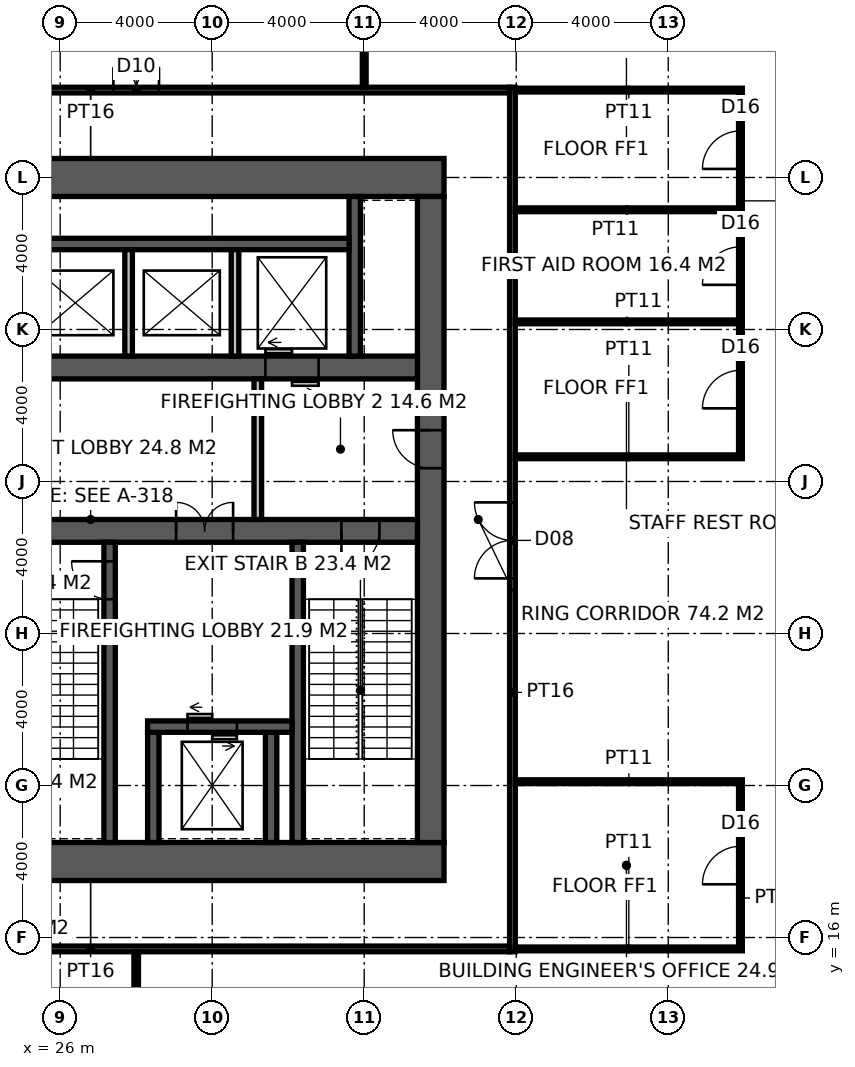
"""IFC4 building model, lengths in metres.
Left out: names, types, materials, properties, quantities, classifications, styles, units other than length and angle.
Written with IfcOpenShell. Run it as: python <this file> out.ifc"""

import sys

from ifc_helpers import new_model, si_unit, direction, frame, frame_2d, origin, place, context, subcontext, project, spatial, rectangle, extrude, element, fill, save


model = new_model("IFC4")
c1 = context("Model", 3, precision=1e-05, world=origin(), true_north=direction((0.0, 1.0)))
c2 = subcontext(c1, "Body", "Model", "MODEL_VIEW")
j1 = project(units=[si_unit("LENGTHUNIT", "METRE"), si_unit("PLANEANGLEUNIT", "RADIAN")], contexts=[c1])
p1 = place(None, origin())
s1 = spatial("IfcSite", under=j1, at=p1, CompositionType="ELEMENT")
p2 = place(p1, origin())
s2 = spatial("IfcBuilding", under=s1, at=p2, CompositionType="ELEMENT")
p3 = place(p2, frame((0.0, 0.0, 71.0)))
s3 = spatial("IfcBuildingStorey", under=s2, at=p3, CompositionType="ELEMENT", Elevation=71.0)
p4 = place(p3, frame((18.5, 18.0, -0.15), z_axis=(0.0, 0.0, 1.0), x_axis=(1.0, 0.0, 0.0)))
e1 = element("IfcWall", 1, at=p4, inside=s3, PredefinedType="SHEAR", context=c2, shape_type="SweptSolid", body=[
    extrude(rectangle(XDim=17.6, YDim=1.0, at=frame_2d((8.8, 0.0))), origin(), (0.0, 0.0, 1.0), 5.4),
])
p5 = place(p4, frame((3.45, 0.0, 0.15)))
e2 = element("IfcOpeningElement", 2, at=p5, cuts=e1, PredefinedType="OPENING", context=c2, shape_type="SweptSolid", body=[
    extrude(rectangle(XDim=1.5, YDim=2.4, at=frame_2d((0.75, 1.2))), frame((0.0, 0.51, 0.0), z_axis=(0.0, -1.0, 0.0), x_axis=(1.0, 0.0, 0.0)), (0.0, 0.0, 1.0), 1.02),
])
p6 = place(p3, frame((18.5, 36.0, -0.15), z_axis=(0.0, 0.0, 1.0), x_axis=(1.0, 0.0, 0.0)))
e3 = element("IfcWall", 3, at=p6, inside=s3, PredefinedType="SHEAR", context=c2, shape_type="SweptSolid", body=[
    extrude(rectangle(XDim=17.6, YDim=1.0, at=frame_2d((8.8, 0.0))), origin(), (0.0, 0.0, 1.0), 5.4),
])
p7 = place(p3, frame((35.75, 18.5, -0.15), z_axis=(0.0, 0.0, 1.0), x_axis=(0.0, 1.0, 0.0)))
e4 = element("IfcWall", 4, at=p7, inside=s3, PredefinedType="SHEAR", context=c2, shape_type="SweptSolid", body=[
    extrude(rectangle(XDim=17.0, YDim=0.7, at=frame_2d((8.5, 0.0))), origin(), (0.0, 0.0, 1.0), 5.4),
])
p8 = place(p7, frame((9.85, 0.0, 0.15)))
e5 = element("IfcOpeningElement", 5, at=p8, cuts=e4, PredefinedType="OPENING", context=c2, shape_type="SweptSolid", body=[
    extrude(rectangle(XDim=1.0, YDim=2.2, at=frame_2d((0.5, 1.1))), frame((0.0, 0.36, 0.0), z_axis=(0.0, -1.0, 0.0), x_axis=(1.0, 0.0, 0.0)), (0.0, 0.0, 1.0), 0.72),
])
p9 = place(p3, frame((24.15, 26.7, -0.15), z_axis=(0.0, 0.0, 1.0), x_axis=(1.0, 0.0, 0.0)))
e6 = element("IfcWall", 6, at=p9, inside=s3, PredefinedType="SHEAR", context=c2, shape_type="SweptSolid", body=[
    extrude(rectangle(XDim=11.25, YDim=0.6, at=frame_2d((5.625, 0.0))), origin(), (0.0, 0.0, 1.0), 5.4),
])
p10 = place(p9, frame((9.25, 0.0, 0.15)))
e7 = element("IfcOpeningElement", 7, at=p10, cuts=e6, PredefinedType="OPENING", context=c2, shape_type="SweptSolid", body=[
    extrude(rectangle(XDim=1.0, YDim=2.2, at=frame_2d((0.5, 1.1))), frame((0.0, 0.31, 0.0), z_axis=(0.0, -1.0, 0.0), x_axis=(1.0, 0.0, 0.0)), (0.0, 0.0, 1.0), 0.62),
])
p11 = place(p9, frame((4.9, 0.0, 0.15)))
e8 = element("IfcOpeningElement", 8, at=p11, cuts=e6, PredefinedType="OPENING", context=c2, shape_type="SweptSolid", body=[
    extrude(rectangle(XDim=1.5, YDim=2.4, at=frame_2d((0.75, 1.2))), frame((0.0, 0.31, 0.0), z_axis=(0.0, -1.0, 0.0), x_axis=(1.0, 0.0, 0.0)), (0.0, 0.0, 1.0), 0.62),
])
p12 = place(p3, frame((27.3, 18.5, -0.15), z_axis=(0.0, 0.0, 1.0), x_axis=(0.0, 1.0, 0.0)))
e9 = element("IfcWall", 9, at=p12, inside=s3, PredefinedType="SHEAR", context=c2, shape_type="SweptSolid", body=[
    extrude(rectangle(XDim=7.9, YDim=0.3, at=frame_2d((3.95, 0.0))), origin(), (0.0, 0.0, 1.0), 5.4),
])
p13 = place(p12, frame((6.4, 0.0, 0.15)))
e10 = element("IfcOpeningElement", 10, at=p13, cuts=e9, PredefinedType="OPENING", context=c2, shape_type="SweptSolid", body=[
    extrude(rectangle(XDim=1.0, YDim=2.2, at=frame_2d((0.5, 1.1))), frame((0.0, 0.16, 0.0), z_axis=(0.0, -1.0, 0.0), x_axis=(1.0, 0.0, 0.0)), (0.0, 0.0, 1.0), 0.32),
])
p14 = place(p3, frame((32.25, 18.5, -0.15), z_axis=(0.0, 0.0, 1.0), x_axis=(0.0, 1.0, 0.0)))
e11 = element("IfcWall", 11, at=p14, inside=s3, PredefinedType="SHEAR", context=c2, shape_type="SweptSolid", body=[
    extrude(rectangle(XDim=7.9, YDim=0.3, at=frame_2d((3.95, 0.0))), origin(), (0.0, 0.0, 1.0), 5.4),
])
for number, where, z_axis, x_axis in (
    (12, (28.45, 18.5, -0.15), (0.0, 0.0, 1.0), (0.0, 1.0, 0.0)),
    (13, (31.55, 18.5, -0.15), (0.0, 0.0, 1.0), (0.0, 1.0, 0.0)),
):
    element("IfcWall", number, at=place(p3, frame(where, z_axis=z_axis, x_axis=x_axis)), inside=s3, PredefinedType="SHEAR", context=c2, shape_type="SweptSolid", body=[
        extrude(rectangle(XDim=2.9, YDim=0.3, at=frame_2d((1.45, 0.0))), origin(), (0.0, 0.0, 1.0), 5.4),
    ])
p15 = place(p3, frame((28.3, 21.55, -0.15), z_axis=(0.0, 0.0, 1.0), x_axis=(1.0, 0.0, 0.0)))
e14 = element("IfcWall", 14, at=p15, inside=s3, PredefinedType="SHEAR", context=c2, shape_type="SweptSolid", body=[
    extrude(rectangle(XDim=3.8, YDim=0.3, at=frame_2d((1.9, 0.0))), origin(), (0.0, 0.0, 1.0), 5.4),
])
p16 = place(p15, frame((1.05, 0.0, 0.15)))
e15 = element("IfcOpeningElement", 15, at=p16, cuts=e14, PredefinedType="OPENING", context=c2, shape_type="SweptSolid", body=[
    extrude(rectangle(XDim=1.3, YDim=2.4, at=frame_2d((0.65, 1.2))), frame((0.0, 0.16, 0.0), z_axis=(0.0, -1.0, 0.0), x_axis=(1.0, 0.0, 0.0)), (0.0, 0.0, 1.0), 0.32),
])
p17 = place(p3, frame((24.15, 31.0, -0.15), z_axis=(0.0, 0.0, 1.0), x_axis=(1.0, 0.0, 0.0)))
e16 = element("IfcWall", 16, at=p17, inside=s3, PredefinedType="SHEAR", context=c2, shape_type="SweptSolid", body=[
    extrude(rectangle(XDim=11.25, YDim=0.6, at=frame_2d((5.625, 0.0))), origin(), (0.0, 0.0, 1.0), 5.4),
])
p18 = place(p17, frame((7.25, 0.0, 0.15)))
e17 = element("IfcOpeningElement", 17, at=p18, cuts=e16, PredefinedType="OPENING", context=c2, shape_type="SweptSolid", body=[
    extrude(rectangle(XDim=1.4, YDim=2.4, at=frame_2d((0.7, 1.2))), frame((0.0, 0.31, 0.0), z_axis=(0.0, -1.0, 0.0), x_axis=(1.0, 0.0, 0.0)), (0.0, 0.0, 1.0), 0.62),
])
p19 = place(p3, frame((33.75, 31.3, -0.15), z_axis=(0.0, 0.0, 1.0), x_axis=(0.0, 1.0, 0.0)))
e18 = element("IfcWall", 18, at=p19, inside=s3, PredefinedType="SHEAR", context=c2, shape_type="SweptSolid", body=[
    extrude(rectangle(XDim=4.2, YDim=0.3, at=frame_2d((2.1, 0.0))), origin(), (0.0, 0.0, 1.0), 5.4),
])
p20 = place(p3, frame((25.0, 34.25, -0.15), z_axis=(0.0, 0.0, 1.0), x_axis=(1.0, 0.0, 0.0)))
e19 = element("IfcWall", 19, at=p20, inside=s3, PredefinedType="SHEAR", context=c2, shape_type="SweptSolid", body=[
    extrude(rectangle(XDim=8.6, YDim=0.3, at=frame_2d((4.3, 0.0))), origin(), (0.0, 0.0, 1.0), 5.4),
])
for number, where, z_axis, x_axis in (
    (20, (27.8, 31.3, -0.15), (0.0, 0.0, 1.0), (0.0, 1.0, 0.0)),
    (21, (30.6, 31.3, -0.15), (0.0, 0.0, 1.0), (0.0, 1.0, 0.0)),
):
    element("IfcWall", number, at=place(p3, frame(where, z_axis=z_axis, x_axis=x_axis)), inside=s3, PredefinedType="SOLIDWALL", context=c2, shape_type="SweptSolid", body=[
        extrude(rectangle(XDim=2.8, YDim=0.2, at=frame_2d((1.4, 0.0))), origin(), (0.0, 0.0, 1.0), 5.4),
    ])
p21 = place(p3, frame((31.2, 27.0, 0.0), z_axis=(0.0, 0.0, 1.0), x_axis=(0.0, 1.0, 0.0)))
e22 = element("IfcWall", 22, at=p21, inside=s3, PredefinedType="SOLIDWALL", context=c2, shape_type="SweptSolid", body=[
    extrude(rectangle(XDim=3.7, YDim=0.2, at=frame_2d((1.85, 0.0))), origin(), (0.0, 0.0, 1.0), 5.25),
])
p22 = place(p3, frame((37.9, 15.625, 0.0), z_axis=(0.0, 0.0, 1.0), x_axis=(0.0, 1.0, 0.0)))
e23 = element("IfcWall", 23, at=p22, inside=s3, PredefinedType="PARTITIONING", context=c2, shape_type="SweptSolid", body=[
    extrude(rectangle(XDim=22.75, YDim=0.15, at=frame_2d((11.375, 0.0))), origin(), (0.0, 0.0, 1.0), 4.35),
])
p23 = place(p22, frame((9.825, 0.0, 0.0)))
e24 = element("IfcOpeningElement", 24, at=p23, cuts=e23, PredefinedType="OPENING", context=c2, shape_type="SweptSolid", body=[
    extrude(rectangle(XDim=2.0, YDim=2.4, at=frame_2d((1.0, 1.2))), frame((0.0, 0.085, 0.0), z_axis=(0.0, -1.0, 0.0), x_axis=(1.0, 0.0, 0.0)), (0.0, 0.0, 1.0), 0.17),
])
p24 = place(p3, frame((15.775, 15.7, 0.0), z_axis=(0.0, 0.0, 1.0), x_axis=(1.0, 0.0, 0.0)))
e25 = element("IfcWall", 25, at=p24, inside=s3, PredefinedType="PARTITIONING", context=c2, shape_type="SweptSolid", body=[
    extrude(rectangle(XDim=22.05, YDim=0.15, at=frame_2d((11.025, 0.0))), origin(), (0.0, 0.0, 1.0), 5.25),
])
p25 = place(p3, frame((15.775, 38.3, 0.0), z_axis=(0.0, 0.0, 1.0), x_axis=(1.0, 0.0, 0.0)))
e26 = element("IfcWall", 26, at=p25, inside=s3, PredefinedType="PARTITIONING", context=c2, shape_type="SweptSolid", body=[
    extrude(rectangle(XDim=22.05, YDim=0.15, at=frame_2d((11.025, 0.0))), origin(), (0.0, 0.0, 1.0), 5.25),
])
p26 = place(p25, frame((11.625, 0.0, 0.0)))
e27 = element("IfcOpeningElement", 27, at=p26, cuts=e26, PredefinedType="OPENING", context=c2, shape_type="SweptSolid", body=[
    extrude(rectangle(XDim=1.2, YDim=2.2, at=frame_2d((0.6, 1.1))), frame((0.0, 0.085, 0.0), z_axis=(0.0, -1.0, 0.0), x_axis=(1.0, 0.0, 0.0)), (0.0, 0.0, 1.0), 0.17),
])
p27 = place(p3, frame((34.0, 38.375, 0.0), z_axis=(0.0, 0.0, 1.0), x_axis=(0.0, 1.0, 0.0)))
e28 = element("IfcWall", 28, at=p27, inside=s3, PredefinedType="PARTITIONING", context=c2, shape_type="SweptSolid", body=[
    extrude(rectangle(XDim=3.675, YDim=0.1, at=frame_2d((1.837, 0.0))), origin(), (0.0, 0.0, 1.0), 4.25),
])
p28 = place(p3, frame((28.0, 0.3, 0.0), z_axis=(0.0, 0.0, 1.0), x_axis=(0.0, 1.0, 0.0)))
e29 = element("IfcWall", 29, at=p28, inside=s3, PredefinedType="PARTITIONING", context=c2, shape_type="SweptSolid", body=[
    extrude(rectangle(XDim=15.325, YDim=0.12, at=frame_2d((7.663, 0.0))), origin(), (0.0, 0.0, 1.0), 5.25),
])
p29 = place(p3, frame((37.975, 15.7, 0.0), z_axis=(0.0, 0.0, 1.0), x_axis=(1.0, 0.0, 0.0)))
e30 = element("IfcWall", 30, at=p29, inside=s3, PredefinedType="PARTITIONING", context=c2, shape_type="SweptSolid", body=[
    extrude(rectangle(XDim=5.975, YDim=0.1, at=frame_2d((2.987, 0.0))), origin(), (0.0, 0.0, 1.0), 5.25),
])
p30 = place(p3, frame((37.975, 20.1, 0.0), z_axis=(0.0, 0.0, 1.0), x_axis=(1.0, 0.0, 0.0)))
e31 = element("IfcWall", 31, at=p30, inside=s3, PredefinedType="PARTITIONING", context=c2, shape_type="SweptSolid", body=[
    extrude(rectangle(XDim=5.975, YDim=0.1, at=frame_2d((2.987, 0.0))), origin(), (0.0, 0.0, 1.0), 4.35),
])
p31 = place(p3, frame((37.975, 28.65, 0.0), z_axis=(0.0, 0.0, 1.0), x_axis=(1.0, 0.0, 0.0)))
e32 = element("IfcWall", 32, at=p31, inside=s3, PredefinedType="PARTITIONING", context=c2, shape_type="SweptSolid", body=[
    extrude(rectangle(XDim=5.975, YDim=0.1, at=frame_2d((2.987, 0.0))), origin(), (0.0, 0.0, 1.0), 5.25),
])
p32 = place(p3, frame((37.975, 32.2, 0.0), z_axis=(0.0, 0.0, 1.0), x_axis=(1.0, 0.0, 0.0)))
e33 = element("IfcWall", 33, at=p32, inside=s3, PredefinedType="PARTITIONING", context=c2, shape_type="SweptSolid", body=[
    extrude(rectangle(XDim=5.875, YDim=0.1, at=frame_2d((2.938, 0.0))), origin(), (0.0, 0.0, 1.0), 4.35),
])
p33 = place(p3, frame((37.975, 35.15, 0.0), z_axis=(0.0, 0.0, 1.0), x_axis=(1.0, 0.0, 0.0)))
e34 = element("IfcWall", 34, at=p33, inside=s3, PredefinedType="PARTITIONING", context=c2, shape_type="SweptSolid", body=[
    extrude(rectangle(XDim=5.875, YDim=0.1, at=frame_2d((2.938, 0.0))), origin(), (0.0, 0.0, 1.0), 5.25),
])
p34 = place(p3, frame((37.975, 38.3, 0.0), z_axis=(0.0, 0.0, 1.0), x_axis=(1.0, 0.0, 0.0)))
e35 = element("IfcWall", 35, at=p34, inside=s3, PredefinedType="PARTITIONING", context=c2, shape_type="SweptSolid", body=[
    extrude(rectangle(XDim=5.975, YDim=0.1, at=frame_2d((2.987, 0.0))), origin(), (0.0, 0.0, 1.0), 5.25),
])
p35 = place(p3, frame((43.9, 15.75, 0.0), z_axis=(0.0, 0.0, 1.0), x_axis=(0.0, 1.0, 0.0)))
e36 = element("IfcWall", 36, at=p35, inside=s3, PredefinedType="PARTITIONING", context=c2, shape_type="SweptSolid", body=[
    extrude(rectangle(XDim=4.3, YDim=0.1, at=frame_2d((2.15, 0.0))), origin(), (0.0, 0.0, 1.0), 5.25),
])
p36 = place(p35, frame((1.65, 0.0, 0.0)))
e37 = element("IfcOpeningElement", 37, at=p36, cuts=e36, PredefinedType="OPENING", context=c2, shape_type="SweptSolid", body=[
    extrude(rectangle(XDim=1.0, YDim=2.2, at=frame_2d((0.5, 1.1))), frame((0.0, 0.06, 0.0), z_axis=(0.0, -1.0, 0.0), x_axis=(1.0, 0.0, 0.0)), (0.0, 0.0, 1.0), 0.12),
])
p37 = place(p3, frame((43.9, 28.7, 0.0), z_axis=(0.0, 0.0, 1.0), x_axis=(0.0, 1.0, 0.0)))
e38 = element("IfcWall", 38, at=p37, inside=s3, PredefinedType="PARTITIONING", context=c2, shape_type="SweptSolid", body=[
    extrude(rectangle(XDim=9.55, YDim=0.1, at=frame_2d((4.775, 0.0))), origin(), (0.0, 0.0, 1.0), 5.25),
])
p38 = place(p37, frame((1.225, 0.0, 0.0)))
e39 = element("IfcOpeningElement", 39, at=p38, cuts=e38, PredefinedType="OPENING", context=c2, shape_type="SweptSolid", body=[
    extrude(rectangle(XDim=1.0, YDim=2.2, at=frame_2d((0.5, 1.1))), frame((0.0, 0.06, 0.0), z_axis=(0.0, -1.0, 0.0), x_axis=(1.0, 0.0, 0.0)), (0.0, 0.0, 1.0), 0.12),
])
p39 = place(p37, frame((4.475, 0.0, 0.0)))
e40 = element("IfcOpeningElement", 40, at=p39, cuts=e38, PredefinedType="OPENING", context=c2, shape_type="SweptSolid", body=[
    extrude(rectangle(XDim=1.0, YDim=2.2, at=frame_2d((0.5, 1.1))), frame((0.0, 0.06, 0.0), z_axis=(0.0, -1.0, 0.0), x_axis=(1.0, 0.0, 0.0)), (0.0, 0.0, 1.0), 0.12),
])
p40 = place(p37, frame((7.525, 0.0, 0.0)))
e41 = element("IfcOpeningElement", 41, at=p40, cuts=e38, PredefinedType="OPENING", context=c2, shape_type="SweptSolid", body=[
    extrude(rectangle(XDim=1.0, YDim=2.2, at=frame_2d((0.5, 1.1))), frame((0.0, 0.06, 0.0), z_axis=(0.0, -1.0, 0.0), x_axis=(1.0, 0.0, 0.0)), (0.0, 0.0, 1.0), 0.12),
])
p41 = place(p13, origin())
e42 = element("IfcDoor", 42, at=p41, inside=s3, OperationType="SINGLE_SWING_RIGHT", PredefinedType="DOOR", context=c2, shape_type="SweptSolid", body=[
    extrude(rectangle(XDim=1.0, YDim=2.2, at=frame_2d((0.5, 1.1))), frame((0.0, 0.025, 0.0), z_axis=(0.0, -1.0, 0.0), x_axis=(1.0, 0.0, 0.0)), (0.0, 0.0, 1.0), 0.05),
])
fill(e10, e42)
p42 = place(p10, frame((1.0, 0.0, 0.0), z_axis=(0.0, 0.0, 1.0), x_axis=(-1.0, 0.0, 0.0)))
e43 = element("IfcDoor", 43, at=p42, inside=s3, OperationType="SINGLE_SWING_RIGHT", PredefinedType="DOOR", context=c2, shape_type="SweptSolid", body=[
    extrude(rectangle(XDim=1.0, YDim=2.2, at=frame_2d((0.5, 1.1))), frame((0.0, 0.025, 0.0), z_axis=(0.0, -1.0, 0.0), x_axis=(1.0, 0.0, 0.0)), (0.0, 0.0, 1.0), 0.05),
])
fill(e7, e43)
p43 = place(p8, origin())
e44 = element("IfcDoor", 44, at=p43, inside=s3, OperationType="SINGLE_SWING_RIGHT", PredefinedType="DOOR", context=c2, shape_type="SweptSolid", body=[
    extrude(rectangle(XDim=1.0, YDim=2.2, at=frame_2d((0.5, 1.1))), frame((0.0, 0.025, 0.0), z_axis=(0.0, -1.0, 0.0), x_axis=(1.0, 0.0, 0.0)), (0.0, 0.0, 1.0), 0.05),
])
fill(e5, e44)
p44 = place(p11, origin())
e45 = element("IfcDoor", 45, at=p44, inside=s3, OperationType="DOUBLE_DOOR_DOUBLE_SWING", PredefinedType="DOOR", context=c2, shape_type="SweptSolid", body=[
    extrude(rectangle(XDim=1.5, YDim=2.4, at=frame_2d((0.75, 1.2))), frame((0.0, 0.025, 0.0), z_axis=(0.0, -1.0, 0.0), x_axis=(1.0, 0.0, 0.0)), (0.0, 0.0, 1.0), 0.05),
])
fill(e8, e45)
p45 = place(p26, origin())
e46 = element("IfcDoor", 46, at=p45, inside=s3, OperationType="DOUBLE_DOOR_DOUBLE_SWING", PredefinedType="DOOR", context=c2, shape_type="SweptSolid", body=[
    extrude(rectangle(XDim=1.2, YDim=2.2, at=frame_2d((0.6, 1.1))), frame((0.0, 0.025, 0.0), z_axis=(0.0, -1.0, 0.0), x_axis=(1.0, 0.0, 0.0)), (0.0, 0.0, 1.0), 0.05),
])
fill(e27, e46)
p46 = place(p23, origin())
e47 = element("IfcDoor", 47, at=p46, inside=s3, OperationType="DOUBLE_DOOR_DOUBLE_SWING", PredefinedType="DOOR", context=c2, shape_type="SweptSolid", body=[
    extrude(rectangle(XDim=2.0, YDim=2.4, at=frame_2d((1.0, 1.2))), frame((0.0, 0.025, 0.0), z_axis=(0.0, -1.0, 0.0), x_axis=(1.0, 0.0, 0.0)), (0.0, 0.0, 1.0), 0.05),
])
fill(e24, e47)
p47 = place(p36, origin())
e48 = element("IfcDoor", 48, at=p47, inside=s3, OperationType="SINGLE_SWING_LEFT", PredefinedType="DOOR", context=c2, shape_type="SweptSolid", body=[
    extrude(rectangle(XDim=1.0, YDim=2.2, at=frame_2d((0.5, 1.1))), frame((0.0, 0.025, 0.0), z_axis=(0.0, -1.0, 0.0), x_axis=(1.0, 0.0, 0.0)), (0.0, 0.0, 1.0), 0.05),
])
fill(e37, e48)
p48 = place(p38, origin())
e49 = element("IfcDoor", 49, at=p48, inside=s3, OperationType="SINGLE_SWING_LEFT", PredefinedType="DOOR", context=c2, shape_type="SweptSolid", body=[
    extrude(rectangle(XDim=1.0, YDim=2.2, at=frame_2d((0.5, 1.1))), frame((0.0, 0.025, 0.0), z_axis=(0.0, -1.0, 0.0), x_axis=(1.0, 0.0, 0.0)), (0.0, 0.0, 1.0), 0.05),
])
fill(e39, e49)
p49 = place(p39, origin())
e50 = element("IfcDoor", 50, at=p49, inside=s3, OperationType="SINGLE_SWING_LEFT", PredefinedType="DOOR", context=c2, shape_type="SweptSolid", body=[
    extrude(rectangle(XDim=1.0, YDim=2.2, at=frame_2d((0.5, 1.1))), frame((0.0, 0.025, 0.0), z_axis=(0.0, -1.0, 0.0), x_axis=(1.0, 0.0, 0.0)), (0.0, 0.0, 1.0), 0.05),
])
fill(e40, e50)
p50 = place(p40, origin())
e51 = element("IfcDoor", 51, at=p50, inside=s3, OperationType="SINGLE_SWING_LEFT", PredefinedType="DOOR", context=c2, shape_type="SweptSolid", body=[
    extrude(rectangle(XDim=1.0, YDim=2.2, at=frame_2d((0.5, 1.1))), frame((0.0, 0.025, 0.0), z_axis=(0.0, -1.0, 0.0), x_axis=(1.0, 0.0, 0.0)), (0.0, 0.0, 1.0), 0.05),
])
fill(e41, e51)
p51 = place(p16, origin())
e52 = element("IfcDoor", 52, at=p51, inside=s3, OperationType="DOUBLE_DOOR_SLIDING", PredefinedType="DOOR", context=c2, shape_type="SweptSolid", body=[
    extrude(rectangle(XDim=1.3, YDim=2.4, at=frame_2d((0.65, 1.2))), frame((0.0, 0.025, 0.0), z_axis=(0.0, -1.0, 0.0), x_axis=(1.0, 0.0, 0.0)), (0.0, 0.0, 1.0), 0.05),
])
fill(e15, e52)
p52 = place(p18, origin())
e53 = element("IfcDoor", 53, at=p52, inside=s3, OperationType="DOUBLE_DOOR_SLIDING", PredefinedType="DOOR", context=c2, shape_type="SweptSolid", body=[
    extrude(rectangle(XDim=1.4, YDim=2.4, at=frame_2d((0.7, 1.2))), frame((0.0, 0.025, 0.0), z_axis=(0.0, -1.0, 0.0), x_axis=(1.0, 0.0, 0.0)), (0.0, 0.0, 1.0), 0.05),
])
fill(e17, e53)
save(model, sys.argv[1])
